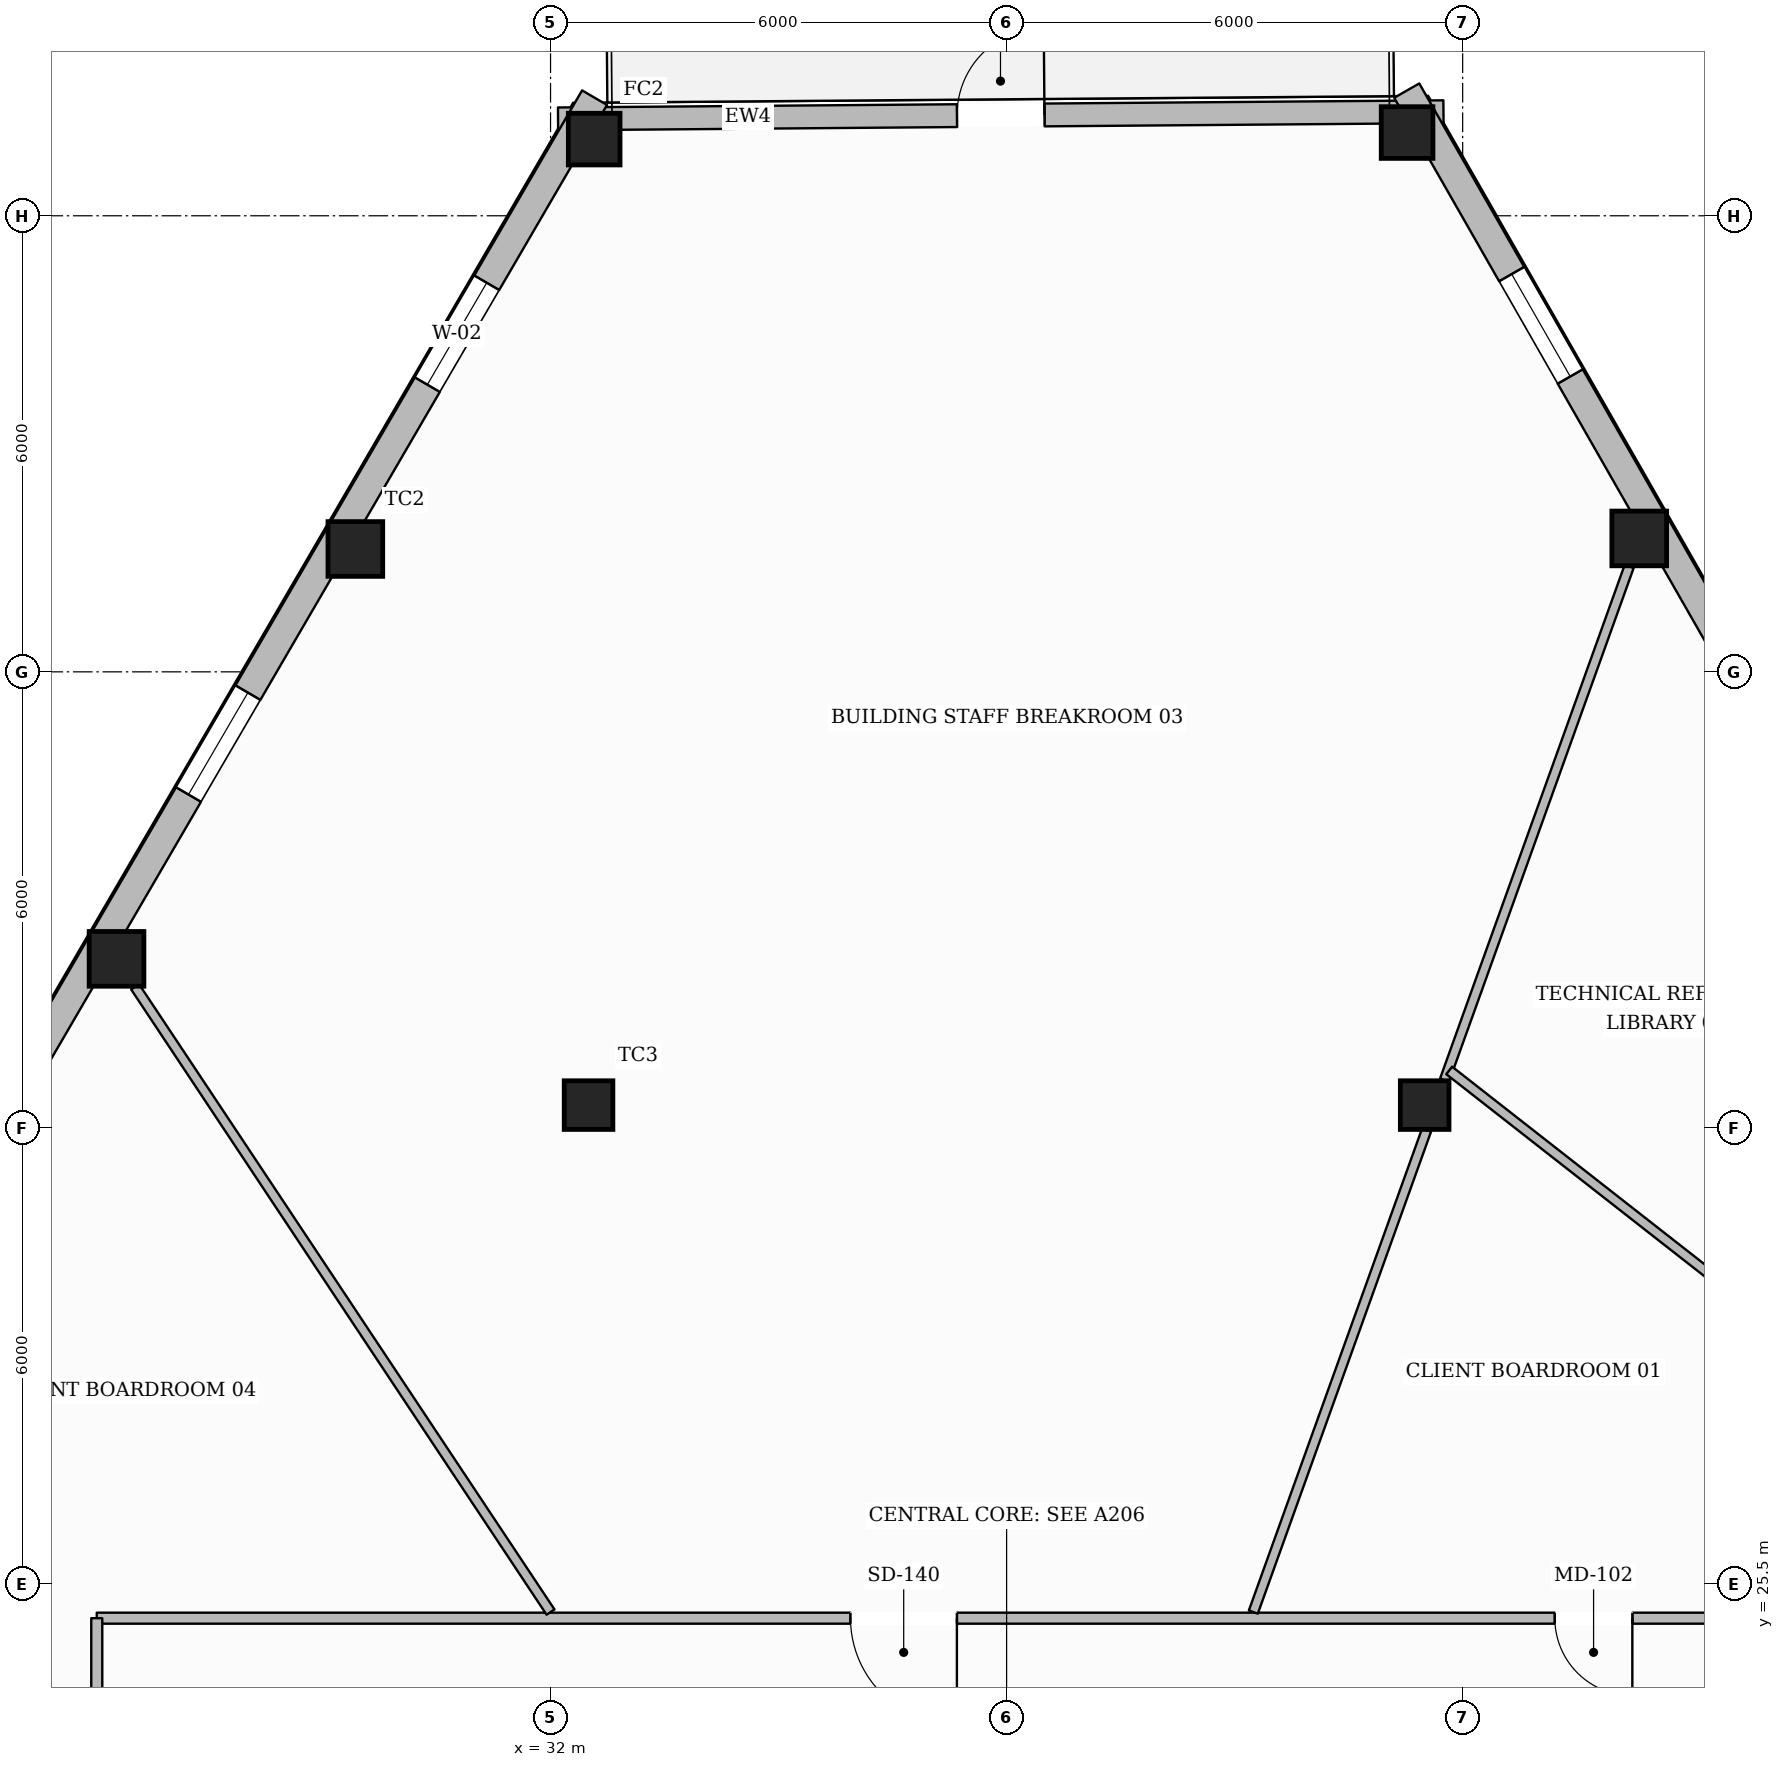
"""IFC4 building model, lengths in metres.
Left out: names, types, materials, properties, quantities, classifications, styles, units other than length and angle.
Written with IfcOpenShell. Run it as: python <this file> out.ifc"""

import sys

from ifc_helpers import new_model, si_unit, direction, frame, frame_2d, origin, origin_2d, place, context, subcontext, project, spatial, rectangle, hollow_rectangle, extrude, element, fill, save


model = new_model("IFC4")
c1 = context("Model", 3, precision=1e-05, world=origin(), true_north=direction((0.0, 1.0)))
c2 = subcontext(c1, "Body", "Model", "MODEL_VIEW")
j1 = project(units=[si_unit("LENGTHUNIT", "METRE"), si_unit("PLANEANGLEUNIT", "RADIAN")], contexts=[c1])
p1 = place(None, origin())
s1 = spatial("IfcSite", under=j1, at=p1, CompositionType="ELEMENT")
p2 = place(p1, origin())
s2 = spatial("IfcBuilding", under=s1, at=p2, CompositionType="ELEMENT")
p3 = place(p2, frame((0.0, 0.0, 147.1)))
s3 = spatial("IfcBuildingStorey", under=s2, at=p3, CompositionType="ELEMENT", Elevation=147.1)
p4 = place(p3, frame((32.574, 44.509, 0.0), z_axis=(0.0, 0.0, 1.0), x_axis=(1.0, 0.0, 0.0)))
e1 = element("IfcColumn", 1, at=p4, inside=s3, PredefinedType="COLUMN", context=c2, shape_type="SweptSolid", body=[
    extrude(hollow_rectangle(XDim=0.68, YDim=0.68, WallThickness=0.03, at=origin_2d()), origin(), (0.0, 0.0, 1.0), 3.6),
])
for number, where, z_axis, x_axis in (
    (2, (29.432, 39.116, 0.0), (0.0, 0.0, 1.0), (1.0, 0.0, 0.0)),
    (3, (26.29, 33.724, 0.0), (0.0, 0.0, 1.0), (1.0, 0.0, 0.0)),
    (4, (46.323, 39.255, 0.0), (0.0, 0.0, 1.0), (1.0, 0.0, 0.0)),
):
    element("IfcColumn", number, at=place(p3, frame(where, z_axis=z_axis, x_axis=x_axis)), inside=s3, PredefinedType="COLUMN", context=c2, shape_type="SweptSolid", body=[
        extrude(hollow_rectangle(XDim=0.72, YDim=0.72, WallThickness=0.032, at=origin_2d()), origin(), (0.0, 0.0, 1.0), 3.6),
    ])
p5 = place(p3, frame((43.269, 44.595, 0.0), z_axis=(0.0, 0.0, 1.0), x_axis=(1.0, 0.0, 0.0)))
e5 = element("IfcColumn", 5, at=p5, inside=s3, PredefinedType="COLUMN", context=c2, shape_type="SweptSolid", body=[
    extrude(hollow_rectangle(XDim=0.68, YDim=0.68, WallThickness=0.03, at=origin_2d()), origin(), (0.0, 0.0, 1.0), 3.6),
])
for number, where, z_axis, x_axis in (
    (6, (32.5, 31.8, 0.0), (0.0, 0.0, 1.0), (1.0, 0.0, 0.0)),
    (7, (43.5, 31.8, 0.0), (0.0, 0.0, 1.0), (1.0, 0.0, 0.0)),
):
    element("IfcColumn", number, at=place(p3, frame(where, z_axis=z_axis, x_axis=x_axis)), inside=s3, PredefinedType="COLUMN", context=c2, shape_type="SweptSolid", body=[
        extrude(hollow_rectangle(XDim=0.64, YDim=0.64, WallThickness=0.028, at=origin_2d()), origin(), (0.0, 0.0, 1.0), 3.6),
    ])
p6 = place(p3, frame((32.099, 44.775, 0.0), z_axis=(0.0, 0.0, 1.0), x_axis=(0.99996744793, 0.008068647933, 0.0)))
e8 = element("IfcWall", 8, at=p6, inside=s3, PredefinedType="STANDARD", context=c2, shape_type="SweptSolid", body=[
    extrude(rectangle(XDim=11.649, YDim=0.3, at=frame_2d((5.825, 0.0))), origin(), (0.0, 0.0, 1.0), 3.059),
])
p7 = place(p6, frame((5.25, 0.0, 0.0)))
e9 = element("IfcOpeningElement", 9, at=p7, cuts=e8, PredefinedType="OPENING", context=c2, shape_type="SweptSolid", body=[
    extrude(rectangle(XDim=1.15, YDim=2.2, at=frame_2d((0.575, 1.1))), frame((0.0, 0.16, 0.0), z_axis=(0.0, -1.0, 0.0), x_axis=(1.0, 0.0, 0.0)), (0.0, 0.0, 1.0), 0.32),
])
p8 = place(p3, frame((13.248, 11.879, 0.0), z_axis=(0.0, 0.0, 1.0), x_axis=(0.503467320033, 0.864014269361, 0.0)))
e10 = element("IfcWall", 10, at=p8, inside=s3, PredefinedType="STANDARD", context=c2, shape_type="SweptSolid", body=[
    extrude(rectangle(XDim=38.396, YDim=0.38, at=frame_2d((19.198, 0.0))), origin(), (0.0, 0.0, 1.0), 3.059),
])
p9 = place(p8, frame((34.027, 0.0, 0.65)))
e11 = element("IfcOpeningElement", 11, at=p9, cuts=e10, PredefinedType="OPENING", context=c2, shape_type="SweptSolid", body=[
    extrude(rectangle(XDim=1.55, YDim=1.75, at=frame_2d((0.775, 0.875))), frame((0.0, 0.2, 0.0), z_axis=(0.0, -1.0, 0.0), x_axis=(1.0, 0.0, 0.0)), (0.0, 0.0, 1.0), 0.4),
])
p10 = place(p8, frame((27.786, 0.0, 0.65)))
e12 = element("IfcOpeningElement", 12, at=p10, cuts=e10, PredefinedType="OPENING", context=c2, shape_type="SweptSolid", body=[
    extrude(rectangle(XDim=1.55, YDim=1.75, at=frame_2d((0.775, 0.875))), frame((0.0, 0.2, 0.0), z_axis=(0.0, -1.0, 0.0), x_axis=(1.0, 0.0, 0.0)), (0.0, 0.0, 1.0), 0.4),
])
p11 = place(p8, frame((15.304, 0.0, 0.65)))
e13 = element("IfcOpeningElement", 13, at=p11, cuts=e10, PredefinedType="OPENING", context=c2, shape_type="SweptSolid", body=[
    extrude(rectangle(XDim=1.55, YDim=1.75, at=frame_2d((0.775, 0.875))), frame((0.0, 0.2, 0.0), z_axis=(0.0, -1.0, 0.0), x_axis=(1.0, 0.0, 0.0)), (0.0, 0.0, 1.0), 0.4),
])
p12 = place(p8, frame((9.063, 0.0, 0.65)))
e14 = element("IfcOpeningElement", 14, at=p12, cuts=e10, PredefinedType="OPENING", context=c2, shape_type="SweptSolid", body=[
    extrude(rectangle(XDim=1.55, YDim=1.75, at=frame_2d((0.775, 0.875))), frame((0.0, 0.2, 0.0), z_axis=(0.0, -1.0, 0.0), x_axis=(1.0, 0.0, 0.0)), (0.0, 0.0, 1.0), 0.4),
])
p13 = place(p8, frame((2.823, 0.0, 0.65)))
e15 = element("IfcOpeningElement", 15, at=p13, cuts=e10, PredefinedType="OPENING", context=c2, shape_type="SweptSolid", body=[
    extrude(rectangle(XDim=1.55, YDim=1.75, at=frame_2d((0.775, 0.875))), frame((0.0, 0.2, 0.0), z_axis=(0.0, -1.0, 0.0), x_axis=(1.0, 0.0, 0.0)), (0.0, 0.0, 1.0), 0.4),
])
p14 = place(p3, frame((43.264, 45.146, 0.0), z_axis=(0.0, 0.0, 1.0), x_axis=(0.496479799544, -0.868048275527, 0.0)))
e16 = element("IfcWall", 16, at=p14, inside=s3, PredefinedType="STANDARD", context=c2, shape_type="SweptSolid", body=[
    extrude(rectangle(XDim=37.869, YDim=0.38, at=frame_2d((18.934, 0.0))), origin(), (0.0, 0.0, 1.0), 3.059),
])
p15 = place(p14, frame((33.541, 0.0, 0.65)))
e17 = element("IfcOpeningElement", 17, at=p15, cuts=e16, PredefinedType="OPENING", context=c2, shape_type="SweptSolid", body=[
    extrude(rectangle(XDim=1.55, YDim=1.75, at=frame_2d((0.775, 0.875))), frame((0.0, 0.2, 0.0), z_axis=(0.0, -1.0, 0.0), x_axis=(1.0, 0.0, 0.0)), (0.0, 0.0, 1.0), 0.4),
])
p16 = place(p14, frame((27.389, 0.0, 0.65)))
e18 = element("IfcOpeningElement", 18, at=p16, cuts=e16, PredefinedType="OPENING", context=c2, shape_type="SweptSolid", body=[
    extrude(rectangle(XDim=1.55, YDim=1.75, at=frame_2d((0.775, 0.875))), frame((0.0, 0.2, 0.0), z_axis=(0.0, -1.0, 0.0), x_axis=(1.0, 0.0, 0.0)), (0.0, 0.0, 1.0), 0.4),
])
p17 = place(p14, frame((15.085, 0.0, 0.65)))
e19 = element("IfcOpeningElement", 19, at=p17, cuts=e16, PredefinedType="OPENING", context=c2, shape_type="SweptSolid", body=[
    extrude(rectangle(XDim=1.55, YDim=1.75, at=frame_2d((0.775, 0.875))), frame((0.0, 0.2, 0.0), z_axis=(0.0, -1.0, 0.0), x_axis=(1.0, 0.0, 0.0)), (0.0, 0.0, 1.0), 0.4),
])
p18 = place(p14, frame((8.934, 0.0, 0.65)))
e20 = element("IfcOpeningElement", 20, at=p18, cuts=e16, PredefinedType="OPENING", context=c2, shape_type="SweptSolid", body=[
    extrude(rectangle(XDim=1.55, YDim=1.75, at=frame_2d((0.775, 0.875))), frame((0.0, 0.2, 0.0), z_axis=(0.0, -1.0, 0.0), x_axis=(1.0, 0.0, 0.0)), (0.0, 0.0, 1.0), 0.4),
])
p19 = place(p14, frame((2.782, 0.0, 0.65)))
e21 = element("IfcOpeningElement", 21, at=p19, cuts=e16, PredefinedType="OPENING", context=c2, shape_type="SweptSolid", body=[
    extrude(rectangle(XDim=1.55, YDim=1.75, at=frame_2d((0.775, 0.875))), frame((0.0, 0.2, 0.0), z_axis=(0.0, -1.0, 0.0), x_axis=(1.0, 0.0, 0.0)), (0.0, 0.0, 1.0), 0.4),
])
p20 = place(p3, frame((49.97, 25.05, 0.0), z_axis=(0.0, 0.0, 1.0), x_axis=(-1.0, 0.0, 0.0)))
e22 = element("IfcWall", 22, at=p20, inside=s3, PredefinedType="PARTITIONING", context=c2, shape_type="SweptSolid", body=[
    extrude(rectangle(XDim=23.94, YDim=0.145, at=frame_2d((11.97, 0.0))), origin(), (0.0, 0.0, 1.0), 3.6),
])
p21 = place(p20, frame((3.738, 0.0, 0.0)))
e23 = element("IfcOpeningElement", 23, at=p21, cuts=e22, PredefinedType="OPENING", context=c2, shape_type="SweptSolid", body=[
    extrude(rectangle(XDim=1.02, YDim=2.15, at=frame_2d((0.51, 1.075))), frame((0.0, 0.083, 0.0), z_axis=(0.0, -1.0, 0.0), x_axis=(1.0, 0.0, 0.0)), (0.0, 0.0, 1.0), 0.165),
])
p22 = place(p20, frame((12.624, 0.0, 0.0)))
e24 = element("IfcOpeningElement", 24, at=p22, cuts=e22, PredefinedType="OPENING", context=c2, shape_type="SweptSolid", body=[
    extrude(rectangle(XDim=1.4, YDim=2.2, at=frame_2d((0.7, 1.1))), frame((0.0, 0.083, 0.0), z_axis=(0.0, -1.0, 0.0), x_axis=(1.0, 0.0, 0.0)), (0.0, 0.0, 1.0), 0.165),
])
p23 = place(p3, frame((26.03, 25.05, 0.0), z_axis=(0.0, 0.0, 1.0), x_axis=(0.0, -1.0, 0.0)))
e25 = element("IfcWall", 25, at=p23, inside=s3, PredefinedType="PARTITIONING", context=c2, shape_type="SweptSolid", body=[
    extrude(rectangle(XDim=17.9, YDim=0.145, at=frame_2d((8.95, 0.0))), origin(), (0.0, 0.0, 1.0), 3.288),
])
p24 = place(p23, frame((3.638, 0.0, 0.0)))
e26 = element("IfcOpeningElement", 26, at=p24, cuts=e25, PredefinedType="OPENING", context=c2, shape_type="SweptSolid", body=[
    extrude(rectangle(XDim=1.02, YDim=2.15, at=frame_2d((0.51, 1.075))), frame((0.0, 0.083, 0.0), z_axis=(0.0, -1.0, 0.0), x_axis=(1.0, 0.0, 0.0)), (0.0, 0.0, 1.0), 0.165),
])
p25 = place(p23, frame((12.417, 0.0, 0.0)))
e27 = element("IfcOpeningElement", 27, at=p25, cuts=e25, PredefinedType="OPENING", context=c2, shape_type="SweptSolid", body=[
    extrude(rectangle(XDim=1.02, YDim=2.15, at=frame_2d((0.51, 1.075))), frame((0.0, 0.083, 0.0), z_axis=(0.0, -1.0, 0.0), x_axis=(1.0, 0.0, 0.0)), (0.0, 0.0, 1.0), 0.165),
])
p26 = place(p3, frame((41.246, 25.131, 0.0), z_axis=(0.0, 0.0, 1.0), x_axis=(0.338281948688, 0.94104480403, 0.0)))
e28 = element("IfcWall", 28, at=p26, inside=s3, PredefinedType="PARTITIONING", context=c2, shape_type="SweptSolid", body=[
    extrude(rectangle(XDim=6.739, YDim=0.125, at=frame_2d((3.369, 0.0))), origin(), (0.0, 0.0, 1.0), 3.141),
])
p27 = place(p3, frame((43.761, 32.128, 0.0), z_axis=(0.0, 0.0, 1.0), x_axis=(0.338249995955, 0.941056289622, 0.0)))
e29 = element("IfcWall", 29, at=p27, inside=s3, PredefinedType="PARTITIONING", context=c2, shape_type="SweptSolid", body=[
    extrude(rectangle(XDim=7.182, YDim=0.125, at=frame_2d((3.591, 0.0))), origin(), (0.0, 0.0, 1.0), 3.6),
])
p28 = place(p3, frame((32.0, 25.131, 0.0), z_axis=(0.0, 0.0, 1.0), x_axis=(-0.553410221261, 0.83290883475, 0.0)))
e30 = element("IfcWall", 30, at=p28, inside=s3, PredefinedType="PARTITIONING", context=c2, shape_type="SweptSolid", body=[
    extrude(rectangle(XDim=9.876, YDim=0.125, at=frame_2d((4.938, 0.0))), origin(), (0.0, 0.0, 1.0), 3.6),
])
p29 = place(p3, frame((55.117, 23.416, 0.0), z_axis=(0.0, 0.0, 1.0), x_axis=(-0.787472312848, 0.61635002758, 0.0)))
e31 = element("IfcWall", 31, at=p29, inside=s3, PredefinedType="PARTITIONING", context=c2, shape_type="SweptSolid", body=[
    extrude(rectangle(XDim=14.343, YDim=0.125, at=frame_2d((7.171, 0.0))), origin(), (0.0, 0.0, 1.0), 3.288),
])
p30 = place(p29, frame((6.572, 0.0, 0.0)))
e32 = element("IfcOpeningElement", 32, at=p30, cuts=e31, PredefinedType="OPENING", context=c2, shape_type="SweptSolid", body=[
    extrude(rectangle(XDim=0.98, YDim=2.15, at=frame_2d((0.49, 1.075))), frame((0.0, 0.073, 0.0), z_axis=(0.0, -1.0, 0.0), x_axis=(1.0, 0.0, 0.0)), (0.0, 0.0, 1.0), 0.145),
])
p31 = place(p7, origin())
e33 = element("IfcDoor", 33, at=p31, inside=s3, OperationType="SINGLE_SWING_RIGHT", PredefinedType="DOOR", context=c2, shape_type="SweptSolid", body=[
    extrude(rectangle(XDim=1.15, YDim=2.2, at=frame_2d((0.575, 1.1))), frame((0.0, 0.025, 0.0), z_axis=(0.0, -1.0, 0.0), x_axis=(1.0, 0.0, 0.0)), (0.0, 0.0, 1.0), 0.05),
])
fill(e9, e33)
p32 = place(p9, origin())
e34 = element("IfcWindow", 34, at=p32, inside=s3, PartitioningType="SINGLE_PANEL", PredefinedType="WINDOW", context=c2, shape_type="SweptSolid", body=[
    extrude(rectangle(XDim=1.55, YDim=1.75, at=frame_2d((0.775, 0.875))), frame((0.0, 0.03, 0.0), z_axis=(0.0, -1.0, 0.0), x_axis=(1.0, 0.0, 0.0)), (0.0, 0.0, 1.0), 0.06),
])
fill(e11, e34)
p33 = place(p10, origin())
e35 = element("IfcWindow", 35, at=p33, inside=s3, PartitioningType="SINGLE_PANEL", PredefinedType="WINDOW", context=c2, shape_type="SweptSolid", body=[
    extrude(rectangle(XDim=1.55, YDim=1.75, at=frame_2d((0.775, 0.875))), frame((0.0, 0.03, 0.0), z_axis=(0.0, -1.0, 0.0), x_axis=(1.0, 0.0, 0.0)), (0.0, 0.0, 1.0), 0.06),
])
fill(e12, e35)
p34 = place(p19, origin())
e36 = element("IfcWindow", 36, at=p34, inside=s3, PartitioningType="SINGLE_PANEL", PredefinedType="WINDOW", context=c2, shape_type="SweptSolid", body=[
    extrude(rectangle(XDim=1.55, YDim=1.75, at=frame_2d((0.775, 0.875))), frame((0.0, 0.03, 0.0), z_axis=(0.0, -1.0, 0.0), x_axis=(1.0, 0.0, 0.0)), (0.0, 0.0, 1.0), 0.06),
])
fill(e21, e36)
p35 = place(p21, origin())
e37 = element("IfcDoor", 37, at=p35, inside=s3, OperationType="SINGLE_SWING_LEFT", PredefinedType="DOOR", context=c2, shape_type="SweptSolid", body=[
    extrude(rectangle(XDim=1.02, YDim=2.15, at=frame_2d((0.51, 1.075))), frame((0.0, 0.025, 0.0), z_axis=(0.0, -1.0, 0.0), x_axis=(1.0, 0.0, 0.0)), (0.0, 0.0, 1.0), 0.05),
])
fill(e23, e37)
p36 = place(p22, origin())
e38 = element("IfcDoor", 38, at=p36, inside=s3, OperationType="SINGLE_SWING_LEFT", PredefinedType="DOOR", context=c2, shape_type="SweptSolid", body=[
    extrude(rectangle(XDim=1.4, YDim=2.2, at=frame_2d((0.7, 1.1))), frame((0.0, 0.025, 0.0), z_axis=(0.0, -1.0, 0.0), x_axis=(1.0, 0.0, 0.0)), (0.0, 0.0, 1.0), 0.05),
])
fill(e24, e38)
save(model, sys.argv[1])
